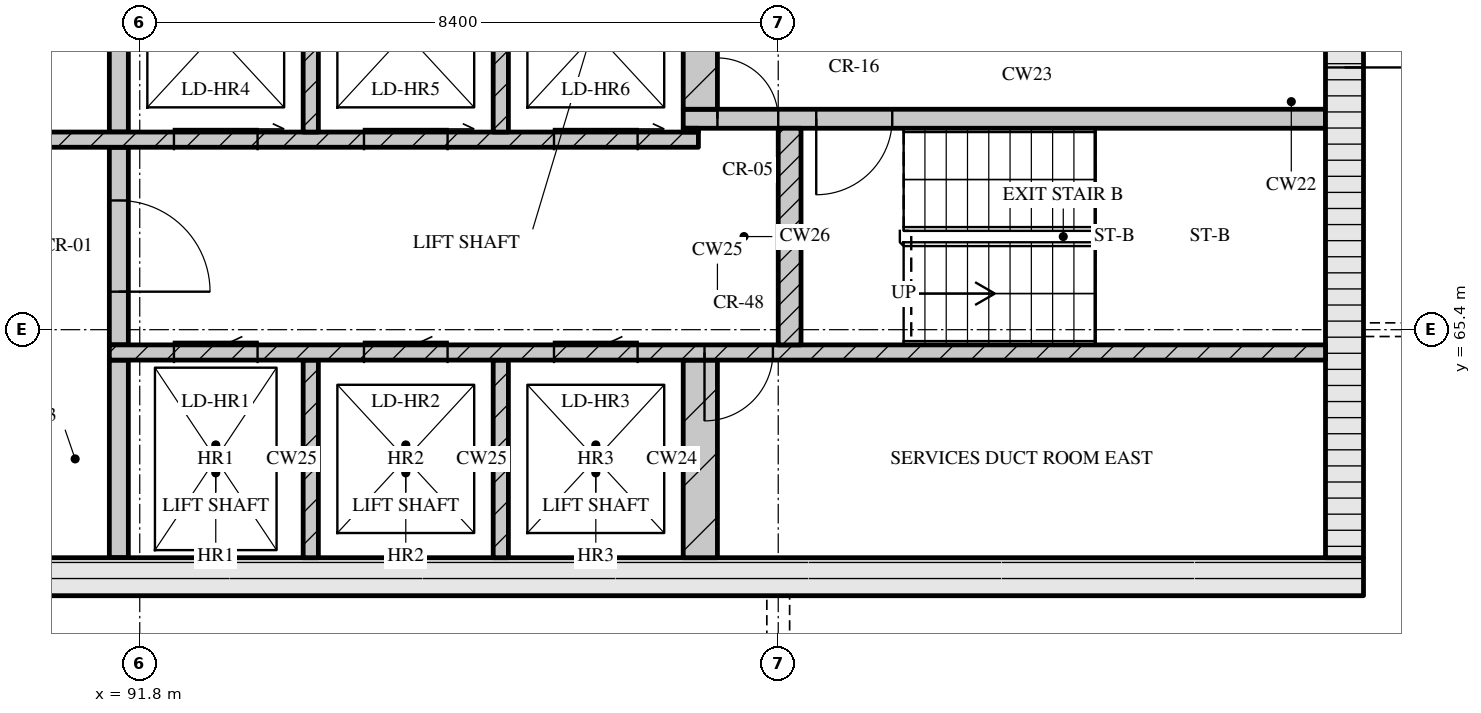
"""IFC4 building model, lengths in metres.
Left out: names, types, materials, properties, quantities, classifications, styles, units other than length and angle.
Written with IfcOpenShell. Run it as: python <this file> out.ifc"""

import sys

from ifc_helpers import new_model, si_unit, direction, frame, frame_2d, origin, place, context, subcontext, project, spatial, rectangle, extrude, element, fill, save


model = new_model("IFC4")
c1 = context("Model", 3, precision=1e-05, world=origin(), true_north=direction((0.0, 1.0)))
c2 = subcontext(c1, "Body", "Model", "MODEL_VIEW")
j1 = project(units=[si_unit("LENGTHUNIT", "METRE"), si_unit("PLANEANGLEUNIT", "RADIAN")], contexts=[c1])
p1 = place(None, origin())
s1 = spatial("IfcSite", under=j1, at=p1, CompositionType="ELEMENT")
p2 = place(p1, origin())
s2 = spatial("IfcBuilding", under=s1, at=p2, CompositionType="ELEMENT")
p3 = place(p2, frame((0.0, 0.0, 292.35)))
s3 = spatial("IfcBuildingStorey", under=s2, at=p3, CompositionType="ELEMENT", Elevation=292.35)
p4 = place(p3, frame((67.3, 62.15, 0.0), z_axis=(0.0, 0.0, 1.0), x_axis=(1.0, 0.0, 0.0)))
e1 = element("IfcWall", 1, at=p4, inside=s3, PredefinedType="SOLIDWALL", context=c2, shape_type="SweptSolid", body=[
    extrude(rectangle(XDim=40.6, YDim=0.5, at=frame_2d((20.3, 0.0))), origin(), (0.0, 0.0, 1.0), 3.32),
])
p5 = place(p4, frame((20.65, 0.0, 0.0)))
e2 = element("IfcOpeningElement", 2, at=p5, cuts=e1, PredefinedType="OPENING", context=c2, shape_type="SweptSolid", body=[
    extrude(rectangle(XDim=1.8, YDim=2.1, at=frame_2d((0.9, 1.05))), frame((0.0, 0.26, 0.0), z_axis=(0.0, -1.0, 0.0), x_axis=(1.0, 0.0, 0.0)), (0.0, 0.0, 1.0), 0.52),
])
p6 = place(p3, frame((107.65, 62.4, 0.0), z_axis=(0.0, 0.0, 1.0), x_axis=(0.0, 1.0, 0.0)))
e3 = element("IfcWall", 3, at=p6, inside=s3, PredefinedType="SOLIDWALL", context=c2, shape_type="SweptSolid", body=[
    extrude(rectangle(XDim=12.0, YDim=0.5, at=frame_2d((6.0, 0.0))), origin(), (0.0, 0.0, 1.0), 3.32),
])
p7 = place(p6, frame((6.45, 0.0, 0.0)))
e4 = element("IfcOpeningElement", 4, at=p7, cuts=e3, PredefinedType="OPENING", context=c2, shape_type="SweptSolid", body=[
    extrude(rectangle(XDim=1.2, YDim=2.1, at=frame_2d((0.6, 1.05))), frame((0.0, 0.26, 0.0), z_axis=(0.0, -1.0, 0.0), x_axis=(1.0, 0.0, 0.0)), (0.0, 0.0, 1.0), 0.52),
])
p8 = place(p3, frame((91.525, 62.4, 0.0), z_axis=(0.0, 0.0, 1.0), x_axis=(0.0, 1.0, 0.0)))
e5 = element("IfcWall", 5, at=p8, inside=s3, PredefinedType="SOLIDWALL", context=c2, shape_type="SweptSolid", body=[
    extrude(rectangle(XDim=2.6, YDim=0.25, at=frame_2d((1.3, 0.0))), origin(), (0.0, 0.0, 1.0), 3.32),
])
for number, where, z_axis, x_axis in (
    (6, (94.05, 62.4, 0.0), (0.0, 0.0, 1.0), (0.0, 1.0, 0.0)),
    (7, (96.55, 62.4, 0.0), (0.0, 0.0, 1.0), (0.0, 1.0, 0.0)),
):
    element("IfcWall", number, at=place(p3, frame(where, z_axis=z_axis, x_axis=x_axis)), inside=s3, PredefinedType="SOLIDWALL", context=c2, shape_type="SweptSolid", body=[
        extrude(rectangle(XDim=2.6, YDim=0.2, at=frame_2d((1.3, 0.0))), origin(), (0.0, 0.0, 1.0), 3.32),
    ])
p9 = place(p3, frame((99.175, 62.4, 0.0), z_axis=(0.0, 0.0, 1.0), x_axis=(0.0, 1.0, 0.0)))
e8 = element("IfcWall", 8, at=p9, inside=s3, PredefinedType="SOLIDWALL", context=c2, shape_type="SweptSolid", body=[
    extrude(rectangle(XDim=2.6, YDim=0.45, at=frame_2d((1.3, 0.0))), origin(), (0.0, 0.0, 1.0), 3.32),
])
p10 = place(p3, frame((91.4, 65.1, 0.0), z_axis=(0.0, 0.0, 1.0), x_axis=(1.0, 0.0, 0.0)))
e9 = element("IfcWall", 9, at=p10, inside=s3, PredefinedType="SOLIDWALL", context=c2, shape_type="SweptSolid", body=[
    extrude(rectangle(XDim=16.0, YDim=0.2, at=frame_2d((8.0, 0.0))), origin(), (0.0, 0.0, 1.0), 3.32),
])
p11 = place(p10, frame((0.85, 0.0, 0.0)))
e10 = element("IfcOpeningElement", 10, at=p11, cuts=e9, PredefinedType="OPENING", context=c2, shape_type="SweptSolid", body=[
    extrude(rectangle(XDim=1.1, YDim=2.1, at=frame_2d((0.55, 1.05))), frame((0.0, 0.11, 0.0), z_axis=(0.0, -1.0, 0.0), x_axis=(1.0, 0.0, 0.0)), (0.0, 0.0, 1.0), 0.22),
])
p12 = place(p10, frame((3.35, 0.0, 0.0)))
e11 = element("IfcOpeningElement", 11, at=p12, cuts=e9, PredefinedType="OPENING", context=c2, shape_type="SweptSolid", body=[
    extrude(rectangle(XDim=1.1, YDim=2.1, at=frame_2d((0.55, 1.05))), frame((0.0, 0.11, 0.0), z_axis=(0.0, -1.0, 0.0), x_axis=(1.0, 0.0, 0.0)), (0.0, 0.0, 1.0), 0.22),
])
p13 = place(p10, frame((5.85, 0.0, 0.0)))
e12 = element("IfcOpeningElement", 12, at=p13, cuts=e9, PredefinedType="OPENING", context=c2, shape_type="SweptSolid", body=[
    extrude(rectangle(XDim=1.1, YDim=2.1, at=frame_2d((0.55, 1.05))), frame((0.0, 0.11, 0.0), z_axis=(0.0, -1.0, 0.0), x_axis=(1.0, 0.0, 0.0)), (0.0, 0.0, 1.0), 0.22),
])
p14 = place(p10, frame((7.83, 0.0, 0.0)))
e13 = element("IfcOpeningElement", 13, at=p14, cuts=e9, PredefinedType="OPENING", context=c2, shape_type="SweptSolid", body=[
    extrude(rectangle(XDim=0.9, YDim=2.1, at=frame_2d((0.45, 1.05))), frame((0.0, 0.11, 0.0), z_axis=(0.0, -1.0, 0.0), x_axis=(1.0, 0.0, 0.0)), (0.0, 0.0, 1.0), 0.22),
])
p15 = place(p3, frame((91.525, 65.2, 0.0), z_axis=(0.0, 0.0, 1.0), x_axis=(0.0, 1.0, 0.0)))
e14 = element("IfcWall", 14, at=p15, inside=s3, PredefinedType="SOLIDWALL", context=c2, shape_type="SweptSolid", body=[
    extrude(rectangle(XDim=2.6, YDim=0.25, at=frame_2d((1.3, 0.0))), origin(), (0.0, 0.0, 1.0), 3.32),
])
p16 = place(p15, frame((0.7, 0.0, 0.0)))
e15 = element("IfcOpeningElement", 15, at=p16, cuts=e14, PredefinedType="OPENING", context=c2, shape_type="SweptSolid", body=[
    extrude(rectangle(XDim=1.2, YDim=2.1, at=frame_2d((0.6, 1.05))), frame((0.0, 0.135, 0.0), z_axis=(0.0, -1.0, 0.0), x_axis=(1.0, 0.0, 0.0)), (0.0, 0.0, 1.0), 0.27),
])
p17 = place(p3, frame((100.35, 65.2, 0.0), z_axis=(0.0, 0.0, 1.0), x_axis=(0.0, 1.0, 0.0)))
e16 = element("IfcWall", 16, at=p17, inside=s3, PredefinedType="SOLIDWALL", context=c2, shape_type="SweptSolid", body=[
    extrude(rectangle(XDim=2.85, YDim=0.3, at=frame_2d((1.425, 0.0))), origin(), (0.0, 0.0, 1.0), 3.32),
])
p18 = place(p3, frame((76.05, 67.9, 0.0), z_axis=(0.0, 0.0, 1.0), x_axis=(1.0, 0.0, 0.0)))
e17 = element("IfcWall", 17, at=p18, inside=s3, PredefinedType="SOLIDWALL", context=c2, shape_type="SweptSolid", body=[
    extrude(rectangle(XDim=23.1, YDim=0.2, at=frame_2d((11.55, 0.0))), origin(), (0.0, 0.0, 1.0), 3.32),
])
p19 = place(p18, frame((1.95, 0.0, 0.0)))
e18 = element("IfcOpeningElement", 18, at=p19, cuts=e17, PredefinedType="OPENING", context=c2, shape_type="SweptSolid", body=[
    extrude(rectangle(XDim=0.9, YDim=2.1, at=frame_2d((0.45, 1.05))), frame((0.0, 0.11, 0.0), z_axis=(0.0, -1.0, 0.0), x_axis=(1.0, 0.0, 0.0)), (0.0, 0.0, 1.0), 0.22),
])
p20 = place(p18, frame((5.66, 0.0, 0.0)))
e19 = element("IfcOpeningElement", 19, at=p20, cuts=e17, PredefinedType="OPENING", context=c2, shape_type="SweptSolid", body=[
    extrude(rectangle(XDim=0.9, YDim=2.1, at=frame_2d((0.45, 1.05))), frame((0.0, 0.11, 0.0), z_axis=(0.0, -1.0, 0.0), x_axis=(1.0, 0.0, 0.0)), (0.0, 0.0, 1.0), 0.22),
])
p21 = place(p18, frame((9.7, 0.0, 0.0)))
e20 = element("IfcOpeningElement", 20, at=p21, cuts=e17, PredefinedType="OPENING", context=c2, shape_type="SweptSolid", body=[
    extrude(rectangle(XDim=0.9, YDim=2.1, at=frame_2d((0.45, 1.05))), frame((0.0, 0.11, 0.0), z_axis=(0.0, -1.0, 0.0), x_axis=(1.0, 0.0, 0.0)), (0.0, 0.0, 1.0), 0.22),
])
p22 = place(p18, frame((13.55, 0.0, 0.0)))
e21 = element("IfcOpeningElement", 21, at=p22, cuts=e17, PredefinedType="OPENING", context=c2, shape_type="SweptSolid", body=[
    extrude(rectangle(XDim=1.0, YDim=2.1, at=frame_2d((0.5, 1.05))), frame((0.0, 0.11, 0.0), z_axis=(0.0, -1.0, 0.0), x_axis=(1.0, 0.0, 0.0)), (0.0, 0.0, 1.0), 0.22),
])
p23 = place(p18, frame((16.2, 0.0, 0.0)))
e22 = element("IfcOpeningElement", 22, at=p23, cuts=e17, PredefinedType="OPENING", context=c2, shape_type="SweptSolid", body=[
    extrude(rectangle(XDim=1.1, YDim=2.1, at=frame_2d((0.55, 1.05))), frame((0.0, 0.11, 0.0), z_axis=(0.0, -1.0, 0.0), x_axis=(1.0, 0.0, 0.0)), (0.0, 0.0, 1.0), 0.22),
])
p24 = place(p18, frame((18.7, 0.0, 0.0)))
e23 = element("IfcOpeningElement", 23, at=p24, cuts=e17, PredefinedType="OPENING", context=c2, shape_type="SweptSolid", body=[
    extrude(rectangle(XDim=1.1, YDim=2.1, at=frame_2d((0.55, 1.05))), frame((0.0, 0.11, 0.0), z_axis=(0.0, -1.0, 0.0), x_axis=(1.0, 0.0, 0.0)), (0.0, 0.0, 1.0), 0.22),
])
p25 = place(p18, frame((21.2, 0.0, 0.0)))
e24 = element("IfcOpeningElement", 24, at=p25, cuts=e17, PredefinedType="OPENING", context=c2, shape_type="SweptSolid", body=[
    extrude(rectangle(XDim=1.1, YDim=2.1, at=frame_2d((0.55, 1.05))), frame((0.0, 0.11, 0.0), z_axis=(0.0, -1.0, 0.0), x_axis=(1.0, 0.0, 0.0)), (0.0, 0.0, 1.0), 0.22),
])
p26 = place(p3, frame((91.525, 68.0, 0.0), z_axis=(0.0, 0.0, 1.0), x_axis=(0.0, 1.0, 0.0)))
e25 = element("IfcWall", 25, at=p26, inside=s3, PredefinedType="SOLIDWALL", context=c2, shape_type="SweptSolid", body=[
    extrude(rectangle(XDim=2.6, YDim=0.25, at=frame_2d((1.3, 0.0))), origin(), (0.0, 0.0, 1.0), 3.32),
])
for number, where, z_axis, x_axis in (
    (26, (94.05, 68.0, 0.0), (0.0, 0.0, 1.0), (0.0, 1.0, 0.0)),
    (27, (96.55, 68.0, 0.0), (0.0, 0.0, 1.0), (0.0, 1.0, 0.0)),
):
    element("IfcWall", number, at=place(p3, frame(where, z_axis=z_axis, x_axis=x_axis)), inside=s3, PredefinedType="SOLIDWALL", context=c2, shape_type="SweptSolid", body=[
        extrude(rectangle(XDim=2.6, YDim=0.2, at=frame_2d((1.3, 0.0))), origin(), (0.0, 0.0, 1.0), 3.32),
    ])
p27 = place(p3, frame((98.95, 68.025, 0.0), z_axis=(0.0, 0.0, 1.0), x_axis=(1.0, 0.0, 0.0)))
e28 = element("IfcWall", 28, at=p27, inside=s3, PredefinedType="SOLIDWALL", context=c2, shape_type="SweptSolid", body=[
    extrude(rectangle(XDim=0.2, YDim=0.05, at=frame_2d((0.1, 0.0))), origin(), (0.0, 0.0, 1.0), 3.32),
])
p28 = place(p3, frame((98.95, 68.175, 0.0), z_axis=(0.0, 0.0, 1.0), x_axis=(1.0, 0.0, 0.0)))
e29 = element("IfcWall", 29, at=p28, inside=s3, PredefinedType="SOLIDWALL", context=c2, shape_type="SweptSolid", body=[
    extrude(rectangle(XDim=8.45, YDim=0.25, at=frame_2d((4.225, 0.0))), origin(), (0.0, 0.0, 1.0), 3.32),
])
p29 = place(p28, frame((0.45, 0.0, 0.0)))
e30 = element("IfcOpeningElement", 30, at=p29, cuts=e29, PredefinedType="OPENING", context=c2, shape_type="SweptSolid", body=[
    extrude(rectangle(XDim=0.8, YDim=2.1, at=frame_2d((0.4, 1.05))), frame((0.0, 0.135, 0.0), z_axis=(0.0, -1.0, 0.0), x_axis=(1.0, 0.0, 0.0)), (0.0, 0.0, 1.0), 0.27),
])
p30 = place(p28, frame((1.75, 0.0, 0.0)))
e31 = element("IfcOpeningElement", 31, at=p30, cuts=e29, PredefinedType="OPENING", context=c2, shape_type="SweptSolid", body=[
    extrude(rectangle(XDim=1.0, YDim=2.1, at=frame_2d((0.5, 1.05))), frame((0.0, 0.135, 0.0), z_axis=(0.0, -1.0, 0.0), x_axis=(1.0, 0.0, 0.0)), (0.0, 0.0, 1.0), 0.27),
])
p31 = place(p3, frame((99.175, 68.3, 0.0), z_axis=(0.0, 0.0, 1.0), x_axis=(0.0, 1.0, 0.0)))
e32 = element("IfcWall", 32, at=p31, inside=s3, PredefinedType="SOLIDWALL", context=c2, shape_type="SweptSolid", body=[
    extrude(rectangle(XDim=2.3, YDim=0.45, at=frame_2d((1.15, 0.0))), origin(), (0.0, 0.0, 1.0), 3.32),
])
p32 = place(p11, origin())
e33 = element("IfcDoor", 33, at=p32, inside=s3, OperationType="SLIDING_TO_LEFT", PredefinedType="DOOR", context=c2, shape_type="SweptSolid", body=[
    extrude(rectangle(XDim=1.1, YDim=2.1, at=frame_2d((0.55, 1.05))), frame((0.0, 0.025, 0.0), z_axis=(0.0, -1.0, 0.0), x_axis=(1.0, 0.0, 0.0)), (0.0, 0.0, 1.0), 0.05),
])
fill(e10, e33)
p33 = place(p12, origin())
e34 = element("IfcDoor", 34, at=p33, inside=s3, OperationType="SLIDING_TO_LEFT", PredefinedType="DOOR", context=c2, shape_type="SweptSolid", body=[
    extrude(rectangle(XDim=1.1, YDim=2.1, at=frame_2d((0.55, 1.05))), frame((0.0, 0.025, 0.0), z_axis=(0.0, -1.0, 0.0), x_axis=(1.0, 0.0, 0.0)), (0.0, 0.0, 1.0), 0.05),
])
fill(e11, e34)
p34 = place(p13, origin())
e35 = element("IfcDoor", 35, at=p34, inside=s3, OperationType="SLIDING_TO_LEFT", PredefinedType="DOOR", context=c2, shape_type="SweptSolid", body=[
    extrude(rectangle(XDim=1.1, YDim=2.1, at=frame_2d((0.55, 1.05))), frame((0.0, 0.025, 0.0), z_axis=(0.0, -1.0, 0.0), x_axis=(1.0, 0.0, 0.0)), (0.0, 0.0, 1.0), 0.05),
])
fill(e12, e35)
p35 = place(p14, origin())
e36 = element("IfcDoor", 36, at=p35, inside=s3, OperationType="SINGLE_SWING_RIGHT", PredefinedType="DOOR", context=c2, shape_type="SweptSolid", body=[
    extrude(rectangle(XDim=0.9, YDim=2.1, at=frame_2d((0.45, 1.05))), frame((0.0, 0.025, 0.0), z_axis=(0.0, -1.0, 0.0), x_axis=(1.0, 0.0, 0.0)), (0.0, 0.0, 1.0), 0.05),
])
fill(e13, e36)
p36 = place(p16, origin())
e37 = element("IfcDoor", 37, at=p36, inside=s3, OperationType="SINGLE_SWING_RIGHT", PredefinedType="DOOR", context=c2, shape_type="SweptSolid", body=[
    extrude(rectangle(XDim=1.2, YDim=2.1, at=frame_2d((0.6, 1.05))), frame((0.0, 0.025, 0.0), z_axis=(0.0, -1.0, 0.0), x_axis=(1.0, 0.0, 0.0)), (0.0, 0.0, 1.0), 0.05),
])
fill(e15, e37)
p37 = place(p23, origin())
e38 = element("IfcDoor", 38, at=p37, inside=s3, OperationType="SLIDING_TO_RIGHT", PredefinedType="DOOR", context=c2, shape_type="SweptSolid", body=[
    extrude(rectangle(XDim=1.1, YDim=2.1, at=frame_2d((0.55, 1.05))), frame((0.0, 0.025, 0.0), z_axis=(0.0, -1.0, 0.0), x_axis=(1.0, 0.0, 0.0)), (0.0, 0.0, 1.0), 0.05),
])
fill(e22, e38)
p38 = place(p24, origin())
e39 = element("IfcDoor", 39, at=p38, inside=s3, OperationType="SLIDING_TO_RIGHT", PredefinedType="DOOR", context=c2, shape_type="SweptSolid", body=[
    extrude(rectangle(XDim=1.1, YDim=2.1, at=frame_2d((0.55, 1.05))), frame((0.0, 0.025, 0.0), z_axis=(0.0, -1.0, 0.0), x_axis=(1.0, 0.0, 0.0)), (0.0, 0.0, 1.0), 0.05),
])
fill(e23, e39)
p39 = place(p25, origin())
e40 = element("IfcDoor", 40, at=p39, inside=s3, OperationType="SLIDING_TO_RIGHT", PredefinedType="DOOR", context=c2, shape_type="SweptSolid", body=[
    extrude(rectangle(XDim=1.1, YDim=2.1, at=frame_2d((0.55, 1.05))), frame((0.0, 0.025, 0.0), z_axis=(0.0, -1.0, 0.0), x_axis=(1.0, 0.0, 0.0)), (0.0, 0.0, 1.0), 0.05),
])
fill(e24, e40)
p40 = place(p29, origin())
e41 = element("IfcDoor", 41, at=p40, inside=s3, OperationType="SINGLE_SWING_LEFT", PredefinedType="DOOR", context=c2, shape_type="SweptSolid", body=[
    extrude(rectangle(XDim=0.8, YDim=2.1, at=frame_2d((0.4, 1.05))), frame((0.0, 0.025, 0.0), z_axis=(0.0, -1.0, 0.0), x_axis=(1.0, 0.0, 0.0)), (0.0, 0.0, 1.0), 0.05),
])
fill(e30, e41)
p41 = place(p30, origin())
e42 = element("IfcDoor", 42, at=p41, inside=s3, OperationType="SINGLE_SWING_RIGHT", PredefinedType="DOOR", context=c2, shape_type="SweptSolid", body=[
    extrude(rectangle(XDim=1.0, YDim=2.1, at=frame_2d((0.5, 1.05))), frame((0.0, 0.025, 0.0), z_axis=(0.0, -1.0, 0.0), x_axis=(1.0, 0.0, 0.0)), (0.0, 0.0, 1.0), 0.05),
])
fill(e31, e42)
p42 = place(p7, origin())
e43 = element("IfcDoor", 43, at=p42, inside=s3, OperationType="SINGLE_SWING_RIGHT", PredefinedType="DOOR", context=c2, shape_type="SweptSolid", body=[
    extrude(rectangle(XDim=1.2, YDim=2.1, at=frame_2d((0.6, 1.05))), frame((0.0, 0.025, 0.0), z_axis=(0.0, -1.0, 0.0), x_axis=(1.0, 0.0, 0.0)), (0.0, 0.0, 1.0), 0.05),
])
fill(e4, e43)
save(model, sys.argv[1])
